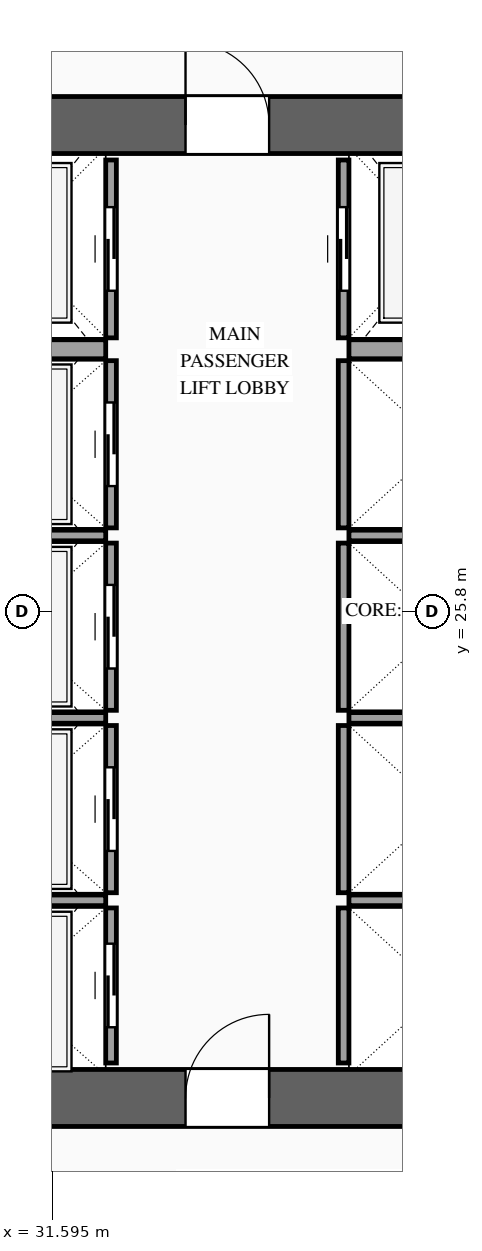
"""IFC4 building model, lengths in metres.
Left out: names, types, materials, properties, quantities, classifications, styles, units other than length and angle.
Written with IfcOpenShell. Run it as: python <this file> out.ifc"""

import sys

from ifc_helpers import new_model, si_unit, direction, frame, frame_2d, origin, place, context, subcontext, project, spatial, rectangle, extrude, source, transform, mapped, element, fill, save


model = new_model("IFC4")
c1 = context("Model", 3, precision=1e-05, world=origin(), true_north=direction((0.0, 1.0)))
c2 = subcontext(c1, "Body", "Model", "MODEL_VIEW")
j1 = project(units=[si_unit("LENGTHUNIT", "METRE"), si_unit("PLANEANGLEUNIT", "RADIAN")], contexts=[c1])
p1 = place(None, origin())
s1 = spatial("IfcSite", under=j1, at=p1, CompositionType="ELEMENT")
p2 = place(p1, origin())
s2 = spatial("IfcBuilding", under=s1, at=p2, CompositionType="ELEMENT")
p3 = place(p2, frame((0.0, 0.0, 104.6)))
s3 = spatial("IfcBuildingStorey", under=s2, at=p3, CompositionType="ELEMENT", Elevation=104.6)
p4 = place(p3, frame((23.425, 19.4, 0.0), z_axis=(0.0, 0.0, 1.0), x_axis=(1.0, 0.0, 0.0)))
e1 = element("IfcWall", 1, at=p4, inside=s3, PredefinedType="SHEAR", context=c2, shape_type="SweptSolid", body=[
    extrude(rectangle(XDim=27.15, YDim=0.75, at=frame_2d((13.575, 0.0))), origin(), (0.0, 0.0, 1.0), 3.6),
])
p5 = place(p4, frame((2.025, 0.0, 0.0)))
e2 = element("IfcOpeningElement", 2, at=p5, cuts=e1, PredefinedType="OPENING", context=c2, shape_type="SweptSolid", body=[
    extrude(rectangle(XDim=1.1, YDim=2.2, at=frame_2d((0.55, 1.1))), frame((0.0, 0.39, 0.0), z_axis=(0.0, -1.0, 0.0), x_axis=(1.0, 0.0, 0.0)), (0.0, 0.0, 1.0), 0.78),
])
p6 = place(p4, frame((9.925, 0.0, 0.0)))
e3 = element("IfcOpeningElement", 3, at=p6, cuts=e1, PredefinedType="OPENING", context=c2, shape_type="SweptSolid", body=[
    extrude(rectangle(XDim=1.1, YDim=2.2, at=frame_2d((0.55, 1.1))), frame((0.0, 0.39, 0.0), z_axis=(0.0, -1.0, 0.0), x_axis=(1.0, 0.0, 0.0)), (0.0, 0.0, 1.0), 0.78),
])
p7 = place(p4, frame((23.125, 0.0, 0.0)))
e4 = element("IfcOpeningElement", 4, at=p7, cuts=e1, PredefinedType="OPENING", context=c2, shape_type="SweptSolid", body=[
    extrude(rectangle(XDim=1.1, YDim=2.2, at=frame_2d((0.55, 1.1))), frame((0.0, 0.39, 0.0), z_axis=(0.0, -1.0, 0.0), x_axis=(1.0, 0.0, 0.0)), (0.0, 0.0, 1.0), 0.78),
])
p8 = place(p4, frame((19.745, 0.0, 0.0)))
e5 = element("IfcOpeningElement", 5, at=p8, cuts=e1, PredefinedType="OPENING", context=c2, shape_type="SweptSolid", body=[
    extrude(rectangle(XDim=0.9, YDim=2.15, at=frame_2d((0.45, 1.075))), frame((0.0, 0.39, 0.0), z_axis=(0.0, -1.0, 0.0), x_axis=(1.0, 0.0, 0.0)), (0.0, 0.0, 1.0), 0.78),
])
p9 = place(p4, frame((18.305, 0.0, 0.0)))
e6 = element("IfcOpeningElement", 6, at=p9, cuts=e1, PredefinedType="OPENING", context=c2, shape_type="SweptSolid", body=[
    extrude(rectangle(XDim=0.9, YDim=2.15, at=frame_2d((0.45, 1.075))), frame((0.0, 0.39, 0.0), z_axis=(0.0, -1.0, 0.0), x_axis=(1.0, 0.0, 0.0)), (0.0, 0.0, 1.0), 0.78),
])
p10 = place(p3, frame((23.425, 32.2, 0.0), z_axis=(0.0, 0.0, 1.0), x_axis=(1.0, 0.0, 0.0)))
e7 = element("IfcWall", 7, at=p10, inside=s3, PredefinedType="SHEAR", context=c2, shape_type="SweptSolid", body=[
    extrude(rectangle(XDim=27.15, YDim=0.75, at=frame_2d((13.575, 0.0))), origin(), (0.0, 0.0, 1.0), 3.6),
])
p11 = place(p10, frame((4.645, 0.0, 0.0)))
e8 = element("IfcOpeningElement", 8, at=p11, cuts=e7, PredefinedType="OPENING", context=c2, shape_type="SweptSolid", body=[
    extrude(rectangle(XDim=0.9, YDim=2.15, at=frame_2d((0.45, 1.075))), frame((0.0, 0.39, 0.0), z_axis=(0.0, -1.0, 0.0), x_axis=(1.0, 0.0, 0.0)), (0.0, 0.0, 1.0), 0.78),
])
p12 = place(p10, frame((9.925, 0.0, 0.0)))
e9 = element("IfcOpeningElement", 9, at=p12, cuts=e7, PredefinedType="OPENING", context=c2, shape_type="SweptSolid", body=[
    extrude(rectangle(XDim=1.1, YDim=2.2, at=frame_2d((0.55, 1.1))), frame((0.0, 0.39, 0.0), z_axis=(0.0, -1.0, 0.0), x_axis=(1.0, 0.0, 0.0)), (0.0, 0.0, 1.0), 0.78),
])
p13 = place(p10, frame((15.775, 0.0, 0.0)))
e10 = element("IfcOpeningElement", 10, at=p13, cuts=e7, PredefinedType="OPENING", context=c2, shape_type="SweptSolid", body=[
    extrude(rectangle(XDim=1.1, YDim=2.2, at=frame_2d((0.55, 1.1))), frame((0.0, 0.39, 0.0), z_axis=(0.0, -1.0, 0.0), x_axis=(1.0, 0.0, 0.0)), (0.0, 0.0, 1.0), 0.78),
])
p14 = place(p10, frame((19.745, 0.0, 0.0)))
e11 = element("IfcOpeningElement", 11, at=p14, cuts=e7, PredefinedType="OPENING", context=c2, shape_type="SweptSolid", body=[
    extrude(rectangle(XDim=0.9, YDim=2.15, at=frame_2d((0.45, 1.075))), frame((0.0, 0.39, 0.0), z_axis=(0.0, -1.0, 0.0), x_axis=(1.0, 0.0, 0.0)), (0.0, 0.0, 1.0), 0.78),
])
p15 = place(p3, frame((32.37, 19.86, 0.0), z_axis=(0.0, 0.0, 1.0), x_axis=(0.0, 1.0, 0.0)))
e12 = element("IfcWall", 12, at=p15, inside=s3, PredefinedType="SOLIDWALL", context=c2, shape_type="SweptSolid", body=[
    extrude(rectangle(XDim=2.04, YDim=0.14, at=frame_2d((1.02, 0.0))), origin(), (0.0, 0.0, 1.0), 3.38),
])
p16 = place(p15, frame((0.47, 0.0, 0.0)))
e13 = element("IfcOpeningElement", 13, at=p16, cuts=e12, PredefinedType="OPENING", context=c2, shape_type="SweptSolid", body=[
    extrude(rectangle(XDim=1.1, YDim=2.2, at=frame_2d((0.55, 1.1))), frame((0.0, 0.085, 0.0), z_axis=(0.0, -1.0, 0.0), x_axis=(1.0, 0.0, 0.0)), (0.0, 0.0, 1.0), 0.17),
])
m1 = source(origin(), c2, "Body", "SweptSolid", [
    extrude(rectangle(XDim=2.5, YDim=0.14, at=frame_2d((1.25, 0.0))), origin(), (0.0, 0.0, 1.0), 3.38),
])
p17 = place(p3, frame((29.8, 22.0, 0.0), z_axis=(0.0, 0.0, 1.0), x_axis=(1.0, 0.0, 0.0)))
e14 = element("IfcWall", 14, at=p17, inside=s3, PredefinedType="SOLIDWALL", context=c2, shape_type="MappedRepresentation", body=[
    mapped(m1, transform((0.0, 0.0, 0.0), scale=1.0)),
])
p18 = place(p3, frame((32.37, 22.1, 0.0), z_axis=(0.0, 0.0, 1.0), x_axis=(0.0, 1.0, 0.0)))
e15 = element("IfcWall", 15, at=p18, inside=s3, PredefinedType="SOLIDWALL", context=c2, shape_type="SweptSolid", body=[
    extrude(rectangle(XDim=2.2, YDim=0.14, at=frame_2d((1.1, 0.0))), origin(), (0.0, 0.0, 1.0), 3.38),
])
p19 = place(p18, frame((0.55, 0.0, 0.0)))
e16 = element("IfcOpeningElement", 16, at=p19, cuts=e15, PredefinedType="OPENING", context=c2, shape_type="SweptSolid", body=[
    extrude(rectangle(XDim=1.1, YDim=2.2, at=frame_2d((0.55, 1.1))), frame((0.0, 0.085, 0.0), z_axis=(0.0, -1.0, 0.0), x_axis=(1.0, 0.0, 0.0)), (0.0, 0.0, 1.0), 0.17),
])
p20 = place(p3, frame((29.8, 24.4, 0.0), z_axis=(0.0, 0.0, 1.0), x_axis=(1.0, 0.0, 0.0)))
e17 = element("IfcWall", 17, at=p20, inside=s3, PredefinedType="SOLIDWALL", context=c2, shape_type="MappedRepresentation", body=[
    mapped(m1, transform((0.0, 0.0, 0.0), scale=1.0)),
])
p21 = place(p3, frame((32.37, 24.5, 0.0), z_axis=(0.0, 0.0, 1.0), x_axis=(0.0, 1.0, 0.0)))
e18 = element("IfcWall", 18, at=p21, inside=s3, PredefinedType="SOLIDWALL", context=c2, shape_type="SweptSolid", body=[
    extrude(rectangle(XDim=2.2, YDim=0.14, at=frame_2d((1.1, 0.0))), origin(), (0.0, 0.0, 1.0), 3.38),
])
p22 = place(p21, frame((0.55, 0.0, 0.0)))
e19 = element("IfcOpeningElement", 19, at=p22, cuts=e18, PredefinedType="OPENING", context=c2, shape_type="SweptSolid", body=[
    extrude(rectangle(XDim=1.1, YDim=2.2, at=frame_2d((0.55, 1.1))), frame((0.0, 0.085, 0.0), z_axis=(0.0, -1.0, 0.0), x_axis=(1.0, 0.0, 0.0)), (0.0, 0.0, 1.0), 0.17),
])
p23 = place(p3, frame((29.8, 26.8, 0.0), z_axis=(0.0, 0.0, 1.0), x_axis=(1.0, 0.0, 0.0)))
e20 = element("IfcWall", 20, at=p23, inside=s3, PredefinedType="SOLIDWALL", context=c2, shape_type="MappedRepresentation", body=[
    mapped(m1, transform((0.0, 0.0, 0.0), scale=1.0)),
])
p24 = place(p3, frame((32.37, 26.9, 0.0), z_axis=(0.0, 0.0, 1.0), x_axis=(0.0, 1.0, 0.0)))
e21 = element("IfcWall", 21, at=p24, inside=s3, PredefinedType="SOLIDWALL", context=c2, shape_type="SweptSolid", body=[
    extrude(rectangle(XDim=2.2, YDim=0.14, at=frame_2d((1.1, 0.0))), origin(), (0.0, 0.0, 1.0), 3.38),
])
p25 = place(p24, frame((0.55, 0.0, 0.0)))
e22 = element("IfcOpeningElement", 22, at=p25, cuts=e21, PredefinedType="OPENING", context=c2, shape_type="SweptSolid", body=[
    extrude(rectangle(XDim=1.1, YDim=2.2, at=frame_2d((0.55, 1.1))), frame((0.0, 0.085, 0.0), z_axis=(0.0, -1.0, 0.0), x_axis=(1.0, 0.0, 0.0)), (0.0, 0.0, 1.0), 0.17),
])
p26 = place(p3, frame((32.37, 29.4, 0.0), z_axis=(0.0, 0.0, 1.0), x_axis=(0.0, 1.0, 0.0)))
e23 = element("IfcWall", 23, at=p26, inside=s3, PredefinedType="SOLIDWALL", context=c2, shape_type="SweptSolid", body=[
    extrude(rectangle(XDim=2.34, YDim=0.14, at=frame_2d((1.17, 0.0))), origin(), (0.0, 0.0, 1.0), 3.38),
])
p27 = place(p26, frame((0.62, 0.0, 0.0)))
e24 = element("IfcOpeningElement", 24, at=p27, cuts=e23, PredefinedType="OPENING", context=c2, shape_type="SweptSolid", body=[
    extrude(rectangle(XDim=1.1, YDim=2.2, at=frame_2d((0.55, 1.1))), frame((0.0, 0.085, 0.0), z_axis=(0.0, -1.0, 0.0), x_axis=(1.0, 0.0, 0.0)), (0.0, 0.0, 1.0), 0.17),
])
m2 = source(origin(), c2, "Body", "SweptSolid", [
    extrude(rectangle(XDim=2.5, YDim=0.25, at=frame_2d((1.25, 0.0))), origin(), (0.0, 0.0, 1.0), 3.38),
])
p28 = place(p3, frame((29.8, 29.25, 0.0), z_axis=(0.0, 0.0, 1.0), x_axis=(1.0, 0.0, 0.0)))
e25 = element("IfcWall", 25, at=p28, inside=s3, PredefinedType="SOLIDWALL", context=c2, shape_type="MappedRepresentation", body=[
    mapped(m2, transform((0.0, 0.0, 0.0), scale=1.0)),
])
m3 = source(origin(), c2, "Body", "SweptSolid", [
    extrude(rectangle(XDim=2.04, YDim=0.14, at=frame_2d((1.02, 0.0))), origin(), (0.0, 0.0, 1.0), 3.38),
])
p29 = place(p3, frame((35.43, 19.86, 0.0), z_axis=(0.0, 0.0, 1.0), x_axis=(0.0, 1.0, 0.0)))
e26 = element("IfcWall", 26, at=p29, inside=s3, PredefinedType="SOLIDWALL", context=c2, shape_type="MappedRepresentation", body=[
    mapped(m3, transform((0.0, 0.0, 0.0), scale=1.0)),
])
m4 = source(origin(), c2, "Body", "SweptSolid", [
    extrude(rectangle(XDim=2.4, YDim=0.14, at=frame_2d((1.2, 0.0))), origin(), (0.0, 0.0, 1.0), 3.38),
])
p30 = place(p3, frame((35.5, 22.0, 0.0), z_axis=(0.0, 0.0, 1.0), x_axis=(1.0, 0.0, 0.0)))
e27 = element("IfcWall", 27, at=p30, inside=s3, PredefinedType="SOLIDWALL", context=c2, shape_type="MappedRepresentation", body=[
    mapped(m4, transform((0.0, 0.0, 0.0), scale=1.0)),
])
m5 = source(origin(), c2, "Body", "SweptSolid", [
    extrude(rectangle(XDim=2.2, YDim=0.14, at=frame_2d((1.1, 0.0))), origin(), (0.0, 0.0, 1.0), 3.38),
])
p31 = place(p3, frame((35.43, 22.1, 0.0), z_axis=(0.0, 0.0, 1.0), x_axis=(0.0, 1.0, 0.0)))
e28 = element("IfcWall", 28, at=p31, inside=s3, PredefinedType="SOLIDWALL", context=c2, shape_type="MappedRepresentation", body=[
    mapped(m5, transform((0.0, 0.0, 0.0), scale=1.0)),
])
p32 = place(p3, frame((35.5, 24.4, 0.0), z_axis=(0.0, 0.0, 1.0), x_axis=(1.0, 0.0, 0.0)))
e29 = element("IfcWall", 29, at=p32, inside=s3, PredefinedType="SOLIDWALL", context=c2, shape_type="MappedRepresentation", body=[
    mapped(m4, transform((0.0, 0.0, 0.0), scale=1.0)),
])
p33 = place(p3, frame((35.43, 24.5, 0.0), z_axis=(0.0, 0.0, 1.0), x_axis=(0.0, 1.0, 0.0)))
e30 = element("IfcWall", 30, at=p33, inside=s3, PredefinedType="SOLIDWALL", context=c2, shape_type="MappedRepresentation", body=[
    mapped(m5, transform((0.0, 0.0, 0.0), scale=1.0)),
])
p34 = place(p3, frame((35.5, 26.8, 0.0), z_axis=(0.0, 0.0, 1.0), x_axis=(1.0, 0.0, 0.0)))
e31 = element("IfcWall", 31, at=p34, inside=s3, PredefinedType="SOLIDWALL", context=c2, shape_type="MappedRepresentation", body=[
    mapped(m4, transform((0.0, 0.0, 0.0), scale=1.0)),
])
m6 = source(origin(), c2, "Body", "SweptSolid", [
    extrude(rectangle(XDim=2.2, YDim=0.14, at=frame_2d((1.1, 0.0))), origin(), (0.0, 0.0, 1.0), 3.38),
])
p35 = place(p3, frame((35.43, 26.9, 0.0), z_axis=(0.0, 0.0, 1.0), x_axis=(0.0, 1.0, 0.0)))
e32 = element("IfcWall", 32, at=p35, inside=s3, PredefinedType="SOLIDWALL", context=c2, shape_type="MappedRepresentation", body=[
    mapped(m6, transform((0.0, 0.0, 0.0), scale=1.0)),
])
p36 = place(p3, frame((35.43, 29.4, 0.0), z_axis=(0.0, 0.0, 1.0), x_axis=(0.0, 1.0, 0.0)))
e33 = element("IfcWall", 33, at=p36, inside=s3, PredefinedType="SOLIDWALL", context=c2, shape_type="SweptSolid", body=[
    extrude(rectangle(XDim=2.34, YDim=0.14, at=frame_2d((1.17, 0.0))), origin(), (0.0, 0.0, 1.0), 3.38),
])
p37 = place(p36, frame((0.62, 0.0, 0.0)))
e34 = element("IfcOpeningElement", 34, at=p37, cuts=e33, PredefinedType="OPENING", context=c2, shape_type="SweptSolid", body=[
    extrude(rectangle(XDim=1.1, YDim=2.2, at=frame_2d((0.55, 1.1))), frame((0.0, 0.085, 0.0), z_axis=(0.0, -1.0, 0.0), x_axis=(1.0, 0.0, 0.0)), (0.0, 0.0, 1.0), 0.17),
])
m7 = source(origin(), c2, "Body", "SweptSolid", [
    extrude(rectangle(XDim=2.4, YDim=0.25, at=frame_2d((1.2, 0.0))), origin(), (0.0, 0.0, 1.0), 3.38),
])
p38 = place(p3, frame((35.5, 29.25, 0.0), z_axis=(0.0, 0.0, 1.0), x_axis=(1.0, 0.0, 0.0)))
e35 = element("IfcWall", 35, at=p38, inside=s3, PredefinedType="SOLIDWALL", context=c2, shape_type="MappedRepresentation", body=[
    mapped(m7, transform((0.0, 0.0, 0.0), scale=1.0)),
])
m8 = source(origin(), c2, "Body", "SweptSolid", [
    extrude(rectangle(XDim=1.1, YDim=2.2, at=frame_2d((0.55, 1.1))), frame((0.0, 0.025, 0.0), z_axis=(0.0, -1.0, 0.0), x_axis=(1.0, 0.0, 0.0)), (0.0, 0.0, 1.0), 0.05),
])
p39 = place(p16, origin())
e36 = element("IfcDoor", 36, at=p39, inside=s3, OperationType="SLIDING_TO_LEFT", PredefinedType="DOOR", context=c2, shape_type="MappedRepresentation", body=[
    mapped(m8, transform((0.0, 0.0, 0.0), scale=1.0)),
])
fill(e13, e36)
p40 = place(p19, origin())
e37 = element("IfcDoor", 37, at=p40, inside=s3, OperationType="SLIDING_TO_RIGHT", PredefinedType="DOOR", context=c2, shape_type="MappedRepresentation", body=[
    mapped(m8, transform((0.0, 0.0, 0.0), scale=1.0)),
])
fill(e16, e37)
p41 = place(p22, origin())
e38 = element("IfcDoor", 38, at=p41, inside=s3, OperationType="SLIDING_TO_LEFT", PredefinedType="DOOR", context=c2, shape_type="MappedRepresentation", body=[
    mapped(m8, transform((0.0, 0.0, 0.0), scale=1.0)),
])
fill(e19, e38)
p42 = place(p25, origin())
e39 = element("IfcDoor", 39, at=p42, inside=s3, OperationType="SLIDING_TO_RIGHT", PredefinedType="DOOR", context=c2, shape_type="MappedRepresentation", body=[
    mapped(m8, transform((0.0, 0.0, 0.0), scale=1.0)),
])
fill(e22, e39)
p43 = place(p27, origin())
e40 = element("IfcDoor", 40, at=p43, inside=s3, OperationType="SLIDING_TO_LEFT", PredefinedType="DOOR", context=c2, shape_type="MappedRepresentation", body=[
    mapped(m8, transform((0.0, 0.0, 0.0), scale=1.0)),
])
fill(e24, e40)
p44 = place(p37, origin())
e41 = element("IfcDoor", 41, at=p44, inside=s3, OperationType="SLIDING_TO_RIGHT", PredefinedType="DOOR", context=c2, shape_type="MappedRepresentation", body=[
    mapped(m8, transform((0.0, 0.0, 0.0), scale=1.0)),
])
fill(e34, e41)
m9 = source(origin(), c2, "Body", "SweptSolid", [
    extrude(rectangle(XDim=1.1, YDim=2.2, at=frame_2d((0.55, 1.1))), frame((0.0, 0.025, 0.0), z_axis=(0.0, -1.0, 0.0), x_axis=(1.0, 0.0, 0.0)), (0.0, 0.0, 1.0), 0.05),
])
p45 = place(p6, origin())
e42 = element("IfcDoor", 42, at=p45, inside=s3, OperationType="SINGLE_SWING_RIGHT", PredefinedType="DOOR", context=c2, shape_type="MappedRepresentation", body=[
    mapped(m9, transform((0.0, 0.0, 0.0), scale=1.0)),
])
fill(e3, e42)
p46 = place(p12, origin())
e43 = element("IfcDoor", 43, at=p46, inside=s3, OperationType="SINGLE_SWING_LEFT", PredefinedType="DOOR", context=c2, shape_type="MappedRepresentation", body=[
    mapped(m9, transform((0.0, 0.0, 0.0), scale=1.0)),
])
fill(e9, e43)
save(model, sys.argv[1])
